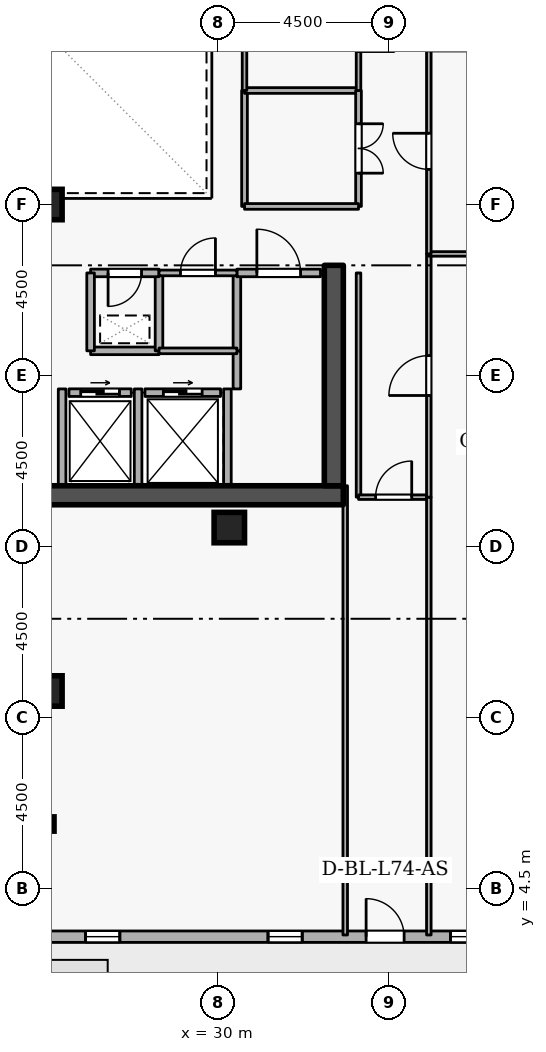
"""IFC4 building model, lengths in metres.
Left out: names, types, materials, properties, quantities, classifications, styles, units other than length and angle.
Written with IfcOpenShell. Run it as: python <this file> out.ifc"""

import sys

from ifc_helpers import new_model, si_unit, direction, frame, frame_2d, origin, origin_2d, place, context, subcontext, project, spatial, rectangle, i_section, extrude, element, fill, save


model = new_model("IFC4")
c1 = context("Model", 3, precision=1e-05, world=origin(), true_north=direction((0.0, 1.0)))
c2 = subcontext(c1, "Body", "Model", "MODEL_VIEW")
j1 = project(units=[si_unit("LENGTHUNIT", "METRE"), si_unit("PLANEANGLEUNIT", "RADIAN")], contexts=[c1])
p1 = place(None, origin())
s1 = spatial("IfcSite", under=j1, at=p1, CompositionType="ELEMENT")
p2 = place(p1, origin())
s2 = spatial("IfcBuilding", under=s1, at=p2, CompositionType="ELEMENT")
p3 = place(p2, frame((0.0, 0.0, 276.3)))
s3 = spatial("IfcBuildingStorey", under=s2, at=p3, CompositionType="ELEMENT", Elevation=276.3)
p4 = place(p3, frame((17.7, 14.85, 0.0), z_axis=(0.0, 0.0, 1.0), x_axis=(1.0, 0.0, 0.0)))
e1 = element("IfcWall", 1, at=p4, inside=s3, PredefinedType="SHEAR", context=c2, shape_type="SweptSolid", body=[
    extrude(rectangle(XDim=15.6, YDim=0.5, at=frame_2d((7.8, 0.0))), origin(), (0.0, 0.0, 1.0), 3.6),
])
p5 = place(p3, frame((33.05, 15.1, 0.0), z_axis=(0.0, 0.0, 1.0), x_axis=(0.0, 1.0, 0.0)))
e2 = element("IfcWall", 2, at=p5, inside=s3, PredefinedType="SHEAR", context=c2, shape_type="SweptSolid", body=[
    extrude(rectangle(XDim=5.8, YDim=0.5, at=frame_2d((2.9, 0.0))), origin(), (0.0, 0.0, 1.0), 3.6),
])
for number, where, z_axis, x_axis in (
    (3, (25.5, 9.7, 0.0), (0.0, 0.0, 1.0), (1.0, 0.0, 0.0)),
    (4, (30.3, 14.0, 0.0), (0.0, 0.0, 1.0), (1.0, 0.0, 0.0)),
    (5, (25.5, 22.5, 0.0), (0.0, 0.0, 1.0), (1.0, 0.0, 0.0)),
):
    element("IfcColumn", number, at=place(p3, frame(where, z_axis=z_axis, x_axis=x_axis)), inside=s3, PredefinedType="COLUMN", context=c2, shape_type="SweptSolid", body=[
        extrude(rectangle(XDim=0.8, YDim=0.8, at=origin_2d()), origin(), (0.0, 0.0, 1.0), 3.6),
    ])
p6 = place(p3, frame((25.5, 6.2, 0.0), z_axis=(0.0, 0.0, 1.0), x_axis=(1.0, 0.0, 0.0)))
e6 = element("IfcColumn", 6, at=p6, inside=s3, PredefinedType="COLUMN", context=c2, shape_type="SweptSolid", body=[
    extrude(i_section(OverallWidth=0.375, OverallDepth=0.375, WebThickness=0.017, FlangeThickness=0.027, FilletRadius=0.015, at=origin_2d()), origin(), (0.0, 0.0, 1.0), 3.6),
])
p7 = place(p3, frame((10.319, 3.235, 0.0), z_axis=(0.0, 0.0, 1.0), x_axis=(1.0, 0.0, 0.0)))
e7 = element("IfcWall", 7, at=p7, inside=s3, PredefinedType="STANDARD", context=c2, shape_type="SweptSolid", body=[
    extrude(rectangle(XDim=36.363, YDim=0.3, at=frame_2d((18.181, 0.0))), origin(), (0.0, 0.0, 1.0), 2.66),
])
p8 = place(p7, frame((23.581, 0.0, 0.0)))
e8 = element("IfcOpeningElement", 8, at=p8, cuts=e7, PredefinedType="OPENING", context=c2, shape_type="SweptSolid", body=[
    extrude(rectangle(XDim=1.0, YDim=2.08, at=frame_2d((0.5, 1.04))), frame((0.0, 0.16, 0.0), z_axis=(0.0, -1.0, 0.0), x_axis=(1.0, 0.0, 0.0)), (0.0, 0.0, 1.0), 0.32),
])
p9 = place(p7, frame((1.8, 0.0, 0.72)))
e9 = element("IfcOpeningElement", 9, at=p9, cuts=e7, PredefinedType="OPENING", context=c2, shape_type="SweptSolid", body=[
    extrude(rectangle(XDim=0.9, YDim=1.75, at=frame_2d((0.45, 0.875))), frame((0.0, 0.16, 0.0), z_axis=(0.0, -1.0, 0.0), x_axis=(1.0, 0.0, 0.0)), (0.0, 0.0, 1.0), 0.32),
])
p10 = place(p7, frame((6.6, 0.0, 0.72)))
e10 = element("IfcOpeningElement", 10, at=p10, cuts=e7, PredefinedType="OPENING", context=c2, shape_type="SweptSolid", body=[
    extrude(rectangle(XDim=0.9, YDim=1.75, at=frame_2d((0.45, 0.875))), frame((0.0, 0.16, 0.0), z_axis=(0.0, -1.0, 0.0), x_axis=(1.0, 0.0, 0.0)), (0.0, 0.0, 1.0), 0.32),
])
p11 = place(p7, frame((11.4, 0.0, 0.72)))
e11 = element("IfcOpeningElement", 11, at=p11, cuts=e7, PredefinedType="OPENING", context=c2, shape_type="SweptSolid", body=[
    extrude(rectangle(XDim=0.9, YDim=1.75, at=frame_2d((0.45, 0.875))), frame((0.0, 0.16, 0.0), z_axis=(0.0, -1.0, 0.0), x_axis=(1.0, 0.0, 0.0)), (0.0, 0.0, 1.0), 0.32),
])
p12 = place(p7, frame((16.2, 0.0, 0.72)))
e12 = element("IfcOpeningElement", 12, at=p12, cuts=e7, PredefinedType="OPENING", context=c2, shape_type="SweptSolid", body=[
    extrude(rectangle(XDim=0.9, YDim=1.75, at=frame_2d((0.45, 0.875))), frame((0.0, 0.16, 0.0), z_axis=(0.0, -1.0, 0.0), x_axis=(1.0, 0.0, 0.0)), (0.0, 0.0, 1.0), 0.32),
])
p13 = place(p7, frame((21.0, 0.0, 0.72)))
e13 = element("IfcOpeningElement", 13, at=p13, cuts=e7, PredefinedType="OPENING", context=c2, shape_type="SweptSolid", body=[
    extrude(rectangle(XDim=0.9, YDim=1.75, at=frame_2d((0.45, 0.875))), frame((0.0, 0.16, 0.0), z_axis=(0.0, -1.0, 0.0), x_axis=(1.0, 0.0, 0.0)), (0.0, 0.0, 1.0), 0.32),
])
p14 = place(p7, frame((25.8, 0.0, 0.72)))
e14 = element("IfcOpeningElement", 14, at=p14, cuts=e7, PredefinedType="OPENING", context=c2, shape_type="SweptSolid", body=[
    extrude(rectangle(XDim=0.9, YDim=1.75, at=frame_2d((0.45, 0.875))), frame((0.0, 0.16, 0.0), z_axis=(0.0, -1.0, 0.0), x_axis=(1.0, 0.0, 0.0)), (0.0, 0.0, 1.0), 0.32),
])
p15 = place(p7, frame((30.6, 0.0, 0.72)))
e15 = element("IfcOpeningElement", 15, at=p15, cuts=e7, PredefinedType="OPENING", context=c2, shape_type="SweptSolid", body=[
    extrude(rectangle(XDim=0.9, YDim=1.75, at=frame_2d((0.45, 0.875))), frame((0.0, 0.16, 0.0), z_axis=(0.0, -1.0, 0.0), x_axis=(1.0, 0.0, 0.0)), (0.0, 0.0, 1.0), 0.32),
])
p16 = place(p3, frame((26.08, 17.55, 0.0), z_axis=(0.0, 0.0, 1.0), x_axis=(1.0, 0.0, 0.0)))
e16 = element("IfcWall", 16, at=p16, inside=s3, PredefinedType="STANDARD", context=c2, shape_type="SweptSolid", body=[
    extrude(rectangle(XDim=1.64, YDim=0.2, at=frame_2d((0.82, 0.0))), origin(), (0.0, 0.0, 1.0), 3.26),
])
p17 = place(p16, frame((0.31, 0.0, 0.0)))
e17 = element("IfcOpeningElement", 17, at=p17, cuts=e16, PredefinedType="OPENING", context=c2, shape_type="SweptSolid", body=[
    extrude(rectangle(XDim=1.02, YDim=2.06, at=frame_2d((0.51, 1.03))), frame((0.0, 0.11, 0.0), z_axis=(0.0, -1.0, 0.0), x_axis=(1.0, 0.0, 0.0)), (0.0, 0.0, 1.0), 0.22),
])
p18 = place(p3, frame((28.08, 17.55, 0.0), z_axis=(0.0, 0.0, 1.0), x_axis=(1.0, 0.0, 0.0)))
e18 = element("IfcWall", 18, at=p18, inside=s3, PredefinedType="STANDARD", context=c2, shape_type="SweptSolid", body=[
    extrude(rectangle(XDim=1.99, YDim=0.2, at=frame_2d((0.995, 0.0))), origin(), (0.0, 0.0, 1.0), 3.26),
])
p19 = place(p18, frame((0.485, 0.0, 0.0)))
e19 = element("IfcOpeningElement", 19, at=p19, cuts=e18, PredefinedType="OPENING", context=c2, shape_type="SweptSolid", body=[
    extrude(rectangle(XDim=1.02, YDim=2.06, at=frame_2d((0.51, 1.03))), frame((0.0, 0.11, 0.0), z_axis=(0.0, -1.0, 0.0), x_axis=(1.0, 0.0, 0.0)), (0.0, 0.0, 1.0), 0.22),
])
for number, where, z_axis, x_axis in (
    (20, (27.9, 15.112, 0.0), (0.0, 0.0, 1.0), (0.0, 1.0, 0.0)),
    (21, (25.9, 15.112, 0.0), (0.0, 0.0, 1.0), (0.0, 1.0, 0.0)),
    (22, (30.25, 15.112, 0.0), (0.0, 0.0, 1.0), (0.0, 1.0, 0.0)),
):
    element("IfcWall", number, at=place(p3, frame(where, z_axis=z_axis, x_axis=x_axis)), inside=s3, PredefinedType="STANDARD", context=c2, shape_type="SweptSolid", body=[
        extrude(rectangle(XDim=2.536, YDim=0.2, at=frame_2d((1.268, 0.0))), origin(), (0.0, 0.0, 1.0), 3.26),
    ])
p20 = place(p3, frame((26.65, 18.65, 0.0), z_axis=(0.0, 0.0, 1.0), x_axis=(1.0, 0.0, 0.0)))
e23 = element("IfcWall", 23, at=p20, inside=s3, PredefinedType="STANDARD", context=c2, shape_type="SweptSolid", body=[
    extrude(rectangle(XDim=1.8, YDim=0.2, at=frame_2d((0.9, 0.0))), origin(), (0.0, 0.0, 1.0), 3.26),
])
p21 = place(p3, frame((28.45, 18.65, 0.0), z_axis=(0.0, 0.0, 1.0), x_axis=(0.0, 1.0, 0.0)))
e24 = element("IfcWall", 24, at=p21, inside=s3, PredefinedType="STANDARD", context=c2, shape_type="SweptSolid", body=[
    extrude(rectangle(XDim=2.05, YDim=0.2, at=frame_2d((1.025, 0.0))), origin(), (0.0, 0.0, 1.0), 3.26),
])
p22 = place(p3, frame((28.45, 20.7, 0.0), z_axis=(0.0, 0.0, 1.0), x_axis=(-1.0, 0.0, 0.0)))
e25 = element("IfcWall", 25, at=p22, inside=s3, PredefinedType="STANDARD", context=c2, shape_type="SweptSolid", body=[
    extrude(rectangle(XDim=1.8, YDim=0.2, at=frame_2d((0.9, 0.0))), origin(), (0.0, 0.0, 1.0), 3.26),
])
p23 = place(p22, frame((0.46, 0.0, 0.0)))
e26 = element("IfcOpeningElement", 26, at=p23, cuts=e25, PredefinedType="OPENING", context=c2, shape_type="SweptSolid", body=[
    extrude(rectangle(XDim=0.88, YDim=2.04, at=frame_2d((0.44, 1.02))), frame((0.0, 0.11, 0.0), z_axis=(0.0, -1.0, 0.0), x_axis=(1.0, 0.0, 0.0)), (0.0, 0.0, 1.0), 0.22),
])
p24 = place(p3, frame((26.65, 20.7, 0.0), z_axis=(0.0, 0.0, 1.0), x_axis=(0.0, -1.0, 0.0)))
e27 = element("IfcWall", 27, at=p24, inside=s3, PredefinedType="STANDARD", context=c2, shape_type="SweptSolid", body=[
    extrude(rectangle(XDim=2.05, YDim=0.2, at=frame_2d((1.025, 0.0))), origin(), (0.0, 0.0, 1.0), 3.26),
])
p25 = place(p3, frame((30.5, 17.648, 0.0), z_axis=(0.0, 0.0, 1.0), x_axis=(0.0, 1.0, 0.0)))
e28 = element("IfcWall", 28, at=p25, inside=s3, PredefinedType="STANDARD", context=c2, shape_type="SweptSolid", body=[
    extrude(rectangle(XDim=1.002, YDim=0.2, at=frame_2d((0.501, 0.0))), origin(), (0.0, 0.0, 1.0), 3.26),
])
p26 = place(p3, frame((30.5, 18.65, 0.0), z_axis=(0.0, 0.0, 1.0), x_axis=(0.0, 1.0, 0.0)))
e29 = element("IfcWall", 29, at=p26, inside=s3, PredefinedType="STANDARD", context=c2, shape_type="SweptSolid", body=[
    extrude(rectangle(XDim=2.05, YDim=0.2, at=frame_2d((1.025, 0.0))), origin(), (0.0, 0.0, 1.0), 3.26),
])
p27 = place(p3, frame((30.5, 20.7, 0.0), z_axis=(0.0, 0.0, 1.0), x_axis=(1.0, 0.0, 0.0)))
e30 = element("IfcWall", 30, at=p27, inside=s3, PredefinedType="STANDARD", context=c2, shape_type="SweptSolid", body=[
    extrude(rectangle(XDim=2.2, YDim=0.2, at=frame_2d((1.1, 0.0))), origin(), (0.0, 0.0, 1.0), 3.26),
])
p28 = place(p27, frame((0.525, 0.0, 0.0)))
e31 = element("IfcOpeningElement", 31, at=p28, cuts=e30, PredefinedType="OPENING", context=c2, shape_type="SweptSolid", body=[
    extrude(rectangle(XDim=1.15, YDim=2.1, at=frame_2d((0.575, 1.05))), frame((0.0, 0.11, 0.0), z_axis=(0.0, -1.0, 0.0), x_axis=(1.0, 0.0, 0.0)), (0.0, 0.0, 1.0), 0.22),
])
p29 = place(p3, frame((30.5, 18.65, 0.0), z_axis=(0.0, 0.0, 1.0), x_axis=(-1.0, 0.0, 0.0)))
e32 = element("IfcWall", 32, at=p29, inside=s3, PredefinedType="PARTITIONING", context=c2, shape_type="SweptSolid", body=[
    extrude(rectangle(XDim=2.05, YDim=0.15, at=frame_2d((1.025, 0.0))), origin(), (0.0, 0.0, 1.0), 3.26),
])
p30 = place(p3, frame((28.45, 20.7, 0.0), z_axis=(0.0, 0.0, 1.0), x_axis=(1.0, 0.0, 0.0)))
e33 = element("IfcWall", 33, at=p30, inside=s3, PredefinedType="PARTITIONING", context=c2, shape_type="SweptSolid", body=[
    extrude(rectangle(XDim=2.05, YDim=0.15, at=frame_2d((1.025, 0.0))), origin(), (0.0, 0.0, 1.0), 3.26),
])
p31 = place(p30, frame((0.565, 0.0, 0.0)))
e34 = element("IfcOpeningElement", 34, at=p31, cuts=e33, PredefinedType="OPENING", context=c2, shape_type="SweptSolid", body=[
    extrude(rectangle(XDim=0.92, YDim=2.08, at=frame_2d((0.46, 1.04))), frame((0.0, 0.085, 0.0), z_axis=(0.0, -1.0, 0.0), x_axis=(1.0, 0.0, 0.0)), (0.0, 0.0, 1.0), 0.17),
])
p32 = place(p3, frame((33.7, 20.7, 0.0), z_axis=(0.0, 0.0, 1.0), x_axis=(0.0, -1.0, 0.0)))
e35 = element("IfcWall", 35, at=p32, inside=s3, PredefinedType="PARTITIONING", context=c2, shape_type="SweptSolid", body=[
    extrude(rectangle(XDim=5.9, YDim=0.12, at=frame_2d((2.95, 0.0))), origin(), (0.0, 0.0, 1.0), 3.26),
])
p33 = place(p3, frame((33.7, 14.8, 0.0), z_axis=(0.0, 0.0, 1.0), x_axis=(1.0, 0.0, 0.0)))
e36 = element("IfcWall", 36, at=p33, inside=s3, PredefinedType="PARTITIONING", context=c2, shape_type="SweptSolid", body=[
    extrude(rectangle(XDim=1.85, YDim=0.12, at=frame_2d((0.925, 0.0))), origin(), (0.0, 0.0, 1.0), 3.26),
])
p34 = place(p33, frame((0.45, 0.0, 0.0)))
e37 = element("IfcOpeningElement", 37, at=p34, cuts=e36, PredefinedType="OPENING", context=c2, shape_type="SweptSolid", body=[
    extrude(rectangle(XDim=0.95, YDim=2.1, at=frame_2d((0.475, 1.05))), frame((0.0, 0.07, 0.0), z_axis=(0.0, -1.0, 0.0), x_axis=(1.0, 0.0, 0.0)), (0.0, 0.0, 1.0), 0.14),
])
p35 = place(p3, frame((35.55, 14.8, 0.0), z_axis=(0.0, 0.0, 1.0), x_axis=(0.0, -1.0, 0.0)))
e38 = element("IfcWall", 38, at=p35, inside=s3, PredefinedType="PARTITIONING", context=c2, shape_type="SweptSolid", body=[
    extrude(rectangle(XDim=11.52, YDim=0.12, at=frame_2d((5.76, 0.0))), origin(), (0.0, 0.0, 1.0), 3.26),
])
p36 = place(p3, frame((33.35, 3.28, 0.0), z_axis=(0.0, 0.0, 1.0), x_axis=(0.0, 1.0, 0.0)))
e39 = element("IfcWall", 39, at=p36, inside=s3, PredefinedType="PARTITIONING", context=c2, shape_type="SweptSolid", body=[
    extrude(rectangle(XDim=11.82, YDim=0.12, at=frame_2d((5.91, 0.0))), origin(), (0.0, 0.0, 1.0), 2.465),
])
p37 = place(p3, frame((35.55, 14.8, 0.0), z_axis=(0.0, 0.0, 1.0), x_axis=(0.0, 1.0, 0.0)))
e40 = element("IfcWall", 40, at=p37, inside=s3, PredefinedType="PARTITIONING", context=c2, shape_type="SweptSolid", body=[
    extrude(rectangle(XDim=6.4, YDim=0.12, at=frame_2d((3.2, 0.0))), origin(), (0.0, 0.0, 1.0), 3.26),
])
p38 = place(p37, frame((2.675, 0.0, 0.0)))
e41 = element("IfcOpeningElement", 41, at=p38, cuts=e40, PredefinedType="OPENING", context=c2, shape_type="SweptSolid", body=[
    extrude(rectangle(XDim=1.05, YDim=2.1, at=frame_2d((0.525, 1.05))), frame((0.0, 0.07, 0.0), z_axis=(0.0, -1.0, 0.0), x_axis=(1.0, 0.0, 0.0)), (0.0, 0.0, 1.0), 0.14),
])
p39 = place(p3, frame((35.55, 21.2, 0.0), z_axis=(0.0, 0.0, 1.0), x_axis=(1.0, 0.0, 0.0)))
e42 = element("IfcWall", 42, at=p39, inside=s3, PredefinedType="PARTITIONING", context=c2, shape_type="SweptSolid", body=[
    extrude(rectangle(XDim=13.67, YDim=0.12, at=frame_2d((6.835, 0.0))), origin(), (0.0, 0.0, 1.0), 3.26),
])
p40 = place(p3, frame((35.55, 21.2, 0.0), z_axis=(0.0, 0.0, 1.0), x_axis=(0.0, 1.0, 0.0)))
e43 = element("IfcWall", 43, at=p40, inside=s3, PredefinedType="PARTITIONING", context=c2, shape_type="SweptSolid", body=[
    extrude(rectangle(XDim=5.4, YDim=0.12, at=frame_2d((2.7, 0.0))), origin(), (0.0, 0.0, 1.0), 3.26),
])
p41 = place(p40, frame((2.225, 0.0, 0.0)))
e44 = element("IfcOpeningElement", 44, at=p41, cuts=e43, PredefinedType="OPENING", context=c2, shape_type="SweptSolid", body=[
    extrude(rectangle(XDim=0.95, YDim=2.1, at=frame_2d((0.475, 1.05))), frame((0.0, 0.07, 0.0), z_axis=(0.0, -1.0, 0.0), x_axis=(1.0, 0.0, 0.0)), (0.0, 0.0, 1.0), 0.14),
])
p42 = place(p3, frame((30.7, 22.45, 0.0), z_axis=(0.0, 0.0, 1.0), x_axis=(0.0, 1.0, 0.0)))
e45 = element("IfcWall", 45, at=p42, inside=s3, PredefinedType="PARTITIONING", context=c2, shape_type="SweptSolid", body=[
    extrude(rectangle(XDim=3.05, YDim=0.15, at=frame_2d((1.525, 0.0))), origin(), (0.0, 0.0, 1.0), 3.26),
])
p43 = place(p3, frame((30.7, 25.5, 0.0), z_axis=(0.0, 0.0, 1.0), x_axis=(1.0, 0.0, 0.0)))
e46 = element("IfcWall", 46, at=p43, inside=s3, PredefinedType="PARTITIONING", context=c2, shape_type="SweptSolid", body=[
    extrude(rectangle(XDim=3.0, YDim=0.15, at=frame_2d((1.5, 0.0))), origin(), (0.0, 0.0, 1.0), 3.26),
])
p44 = place(p3, frame((33.7, 25.5, 0.0), z_axis=(0.0, 0.0, 1.0), x_axis=(0.0, -1.0, 0.0)))
e47 = element("IfcWall", 47, at=p44, inside=s3, PredefinedType="PARTITIONING", context=c2, shape_type="SweptSolid", body=[
    extrude(rectangle(XDim=3.05, YDim=0.15, at=frame_2d((1.525, 0.0))), origin(), (0.0, 0.0, 1.0), 3.26),
])
p45 = place(p44, frame((0.875, 0.0, 0.0)))
e48 = element("IfcOpeningElement", 48, at=p45, cuts=e47, PredefinedType="OPENING", context=c2, shape_type="SweptSolid", body=[
    extrude(rectangle(XDim=1.3, YDim=2.12, at=frame_2d((0.65, 1.06))), frame((0.0, 0.085, 0.0), z_axis=(0.0, -1.0, 0.0), x_axis=(1.0, 0.0, 0.0)), (0.0, 0.0, 1.0), 0.17),
])
p46 = place(p3, frame((33.7, 22.45, 0.0), z_axis=(0.0, 0.0, 1.0), x_axis=(-1.0, 0.0, 0.0)))
e49 = element("IfcWall", 49, at=p46, inside=s3, PredefinedType="PARTITIONING", context=c2, shape_type="SweptSolid", body=[
    extrude(rectangle(XDim=3.0, YDim=0.15, at=frame_2d((1.5, 0.0))), origin(), (0.0, 0.0, 1.0), 3.26),
])
p47 = place(p3, frame((30.7, 25.5, 0.0), z_axis=(0.0, 0.0, 1.0), x_axis=(0.0, 1.0, 0.0)))
e50 = element("IfcWall", 50, at=p47, inside=s3, PredefinedType="PARTITIONING", context=c2, shape_type="SweptSolid", body=[
    extrude(rectangle(XDim=3.0, YDim=0.12, at=frame_2d((1.5, 0.0))), origin(), (0.0, 0.0, 1.0), 3.26),
])
p48 = place(p3, frame((33.7, 28.5, 0.0), z_axis=(0.0, 0.0, 1.0), x_axis=(0.0, -1.0, 0.0)))
e51 = element("IfcWall", 51, at=p48, inside=s3, PredefinedType="PARTITIONING", context=c2, shape_type="SweptSolid", body=[
    extrude(rectangle(XDim=3.0, YDim=0.12, at=frame_2d((1.5, 0.0))), origin(), (0.0, 0.0, 1.0), 3.26),
])
p49 = place(p48, frame((1.025, 0.0, 0.0)))
e52 = element("IfcOpeningElement", 52, at=p49, cuts=e51, PredefinedType="OPENING", context=c2, shape_type="SweptSolid", body=[
    extrude(rectangle(XDim=0.95, YDim=2.1, at=frame_2d((0.475, 1.05))), frame((0.0, 0.07, 0.0), z_axis=(0.0, -1.0, 0.0), x_axis=(1.0, 0.0, 0.0)), (0.0, 0.0, 1.0), 0.14),
])
p50 = place(p8, origin())
e53 = element("IfcDoor", 53, at=p50, inside=s3, OperationType="SINGLE_SWING_LEFT", PredefinedType="DOOR", context=c2, shape_type="SweptSolid", body=[
    extrude(rectangle(XDim=1.0, YDim=2.08, at=frame_2d((0.5, 1.04))), frame((0.0, 0.025, 0.0), z_axis=(0.0, -1.0, 0.0), x_axis=(1.0, 0.0, 0.0)), (0.0, 0.0, 1.0), 0.05),
])
fill(e8, e53)
p51 = place(p12, origin())
e54 = element("IfcWindow", 54, at=p51, inside=s3, PartitioningType="SINGLE_PANEL", PredefinedType="WINDOW", context=c2, shape_type="SweptSolid", body=[
    extrude(rectangle(XDim=0.9, YDim=1.75, at=frame_2d((0.45, 0.875))), frame((0.0, 0.03, 0.0), z_axis=(0.0, -1.0, 0.0), x_axis=(1.0, 0.0, 0.0)), (0.0, 0.0, 1.0), 0.06),
])
fill(e12, e54)
p52 = place(p13, origin())
e55 = element("IfcWindow", 55, at=p52, inside=s3, PartitioningType="SINGLE_PANEL", PredefinedType="WINDOW", context=c2, shape_type="SweptSolid", body=[
    extrude(rectangle(XDim=0.9, YDim=1.75, at=frame_2d((0.45, 0.875))), frame((0.0, 0.03, 0.0), z_axis=(0.0, -1.0, 0.0), x_axis=(1.0, 0.0, 0.0)), (0.0, 0.0, 1.0), 0.06),
])
fill(e13, e55)
p53 = place(p14, origin())
e56 = element("IfcWindow", 56, at=p53, inside=s3, PartitioningType="SINGLE_PANEL", PredefinedType="WINDOW", context=c2, shape_type="SweptSolid", body=[
    extrude(rectangle(XDim=0.9, YDim=1.75, at=frame_2d((0.45, 0.875))), frame((0.0, 0.03, 0.0), z_axis=(0.0, -1.0, 0.0), x_axis=(1.0, 0.0, 0.0)), (0.0, 0.0, 1.0), 0.06),
])
fill(e14, e56)
p54 = place(p17, origin())
e57 = element("IfcDoor", 57, at=p54, inside=s3, OperationType="SLIDING_TO_LEFT", PredefinedType="DOOR", context=c2, shape_type="SweptSolid", body=[
    extrude(rectangle(XDim=1.02, YDim=2.06, at=frame_2d((0.51, 1.03))), frame((0.0, 0.025, 0.0), z_axis=(0.0, -1.0, 0.0), x_axis=(1.0, 0.0, 0.0)), (0.0, 0.0, 1.0), 0.05),
])
fill(e17, e57)
p55 = place(p19, origin())
e58 = element("IfcDoor", 58, at=p55, inside=s3, OperationType="SLIDING_TO_LEFT", PredefinedType="DOOR", context=c2, shape_type="SweptSolid", body=[
    extrude(rectangle(XDim=1.02, YDim=2.06, at=frame_2d((0.51, 1.03))), frame((0.0, 0.025, 0.0), z_axis=(0.0, -1.0, 0.0), x_axis=(1.0, 0.0, 0.0)), (0.0, 0.0, 1.0), 0.05),
])
fill(e19, e58)
p56 = place(p23, origin())
e59 = element("IfcDoor", 59, at=p56, inside=s3, OperationType="SINGLE_SWING_RIGHT", PredefinedType="DOOR", context=c2, shape_type="SweptSolid", body=[
    extrude(rectangle(XDim=0.88, YDim=2.04, at=frame_2d((0.44, 1.02))), frame((0.0, 0.025, 0.0), z_axis=(0.0, -1.0, 0.0), x_axis=(1.0, 0.0, 0.0)), (0.0, 0.0, 1.0), 0.05),
])
fill(e26, e59)
p57 = place(p31, origin())
e60 = element("IfcDoor", 60, at=p57, inside=s3, OperationType="SINGLE_SWING_RIGHT", PredefinedType="DOOR", context=c2, shape_type="SweptSolid", body=[
    extrude(rectangle(XDim=0.92, YDim=2.08, at=frame_2d((0.46, 1.04))), frame((0.0, 0.025, 0.0), z_axis=(0.0, -1.0, 0.0), x_axis=(1.0, 0.0, 0.0)), (0.0, 0.0, 1.0), 0.05),
])
fill(e34, e60)
p58 = place(p28, origin())
e61 = element("IfcDoor", 61, at=p58, inside=s3, OperationType="SINGLE_SWING_LEFT", PredefinedType="DOOR", context=c2, shape_type="SweptSolid", body=[
    extrude(rectangle(XDim=1.15, YDim=2.1, at=frame_2d((0.575, 1.05))), frame((0.0, 0.025, 0.0), z_axis=(0.0, -1.0, 0.0), x_axis=(1.0, 0.0, 0.0)), (0.0, 0.0, 1.0), 0.05),
])
fill(e31, e61)
p59 = place(p34, origin())
e62 = element("IfcDoor", 62, at=p59, inside=s3, OperationType="SINGLE_SWING_RIGHT", PredefinedType="DOOR", context=c2, shape_type="SweptSolid", body=[
    extrude(rectangle(XDim=0.95, YDim=2.1, at=frame_2d((0.475, 1.05))), frame((0.0, 0.025, 0.0), z_axis=(0.0, -1.0, 0.0), x_axis=(1.0, 0.0, 0.0)), (0.0, 0.0, 1.0), 0.05),
])
fill(e37, e62)
p60 = place(p38, origin())
e63 = element("IfcDoor", 63, at=p60, inside=s3, OperationType="SINGLE_SWING_LEFT", PredefinedType="DOOR", context=c2, shape_type="SweptSolid", body=[
    extrude(rectangle(XDim=1.05, YDim=2.1, at=frame_2d((0.525, 1.05))), frame((0.0, 0.025, 0.0), z_axis=(0.0, -1.0, 0.0), x_axis=(1.0, 0.0, 0.0)), (0.0, 0.0, 1.0), 0.05),
])
fill(e41, e63)
p61 = place(p41, origin())
e64 = element("IfcDoor", 64, at=p61, inside=s3, OperationType="SINGLE_SWING_RIGHT", PredefinedType="DOOR", context=c2, shape_type="SweptSolid", body=[
    extrude(rectangle(XDim=0.95, YDim=2.1, at=frame_2d((0.475, 1.05))), frame((0.0, 0.025, 0.0), z_axis=(0.0, -1.0, 0.0), x_axis=(1.0, 0.0, 0.0)), (0.0, 0.0, 1.0), 0.05),
])
fill(e44, e64)
p62 = place(p45, origin())
e65 = element("IfcDoor", 65, at=p62, inside=s3, OperationType="DOUBLE_DOOR_SINGLE_SWING", PredefinedType="DOOR", context=c2, shape_type="SweptSolid", body=[
    extrude(rectangle(XDim=1.3, YDim=2.12, at=frame_2d((0.65, 1.06))), frame((0.0, 0.025, 0.0), z_axis=(0.0, -1.0, 0.0), x_axis=(1.0, 0.0, 0.0)), (0.0, 0.0, 1.0), 0.05),
])
fill(e48, e65)
save(model, sys.argv[1])
